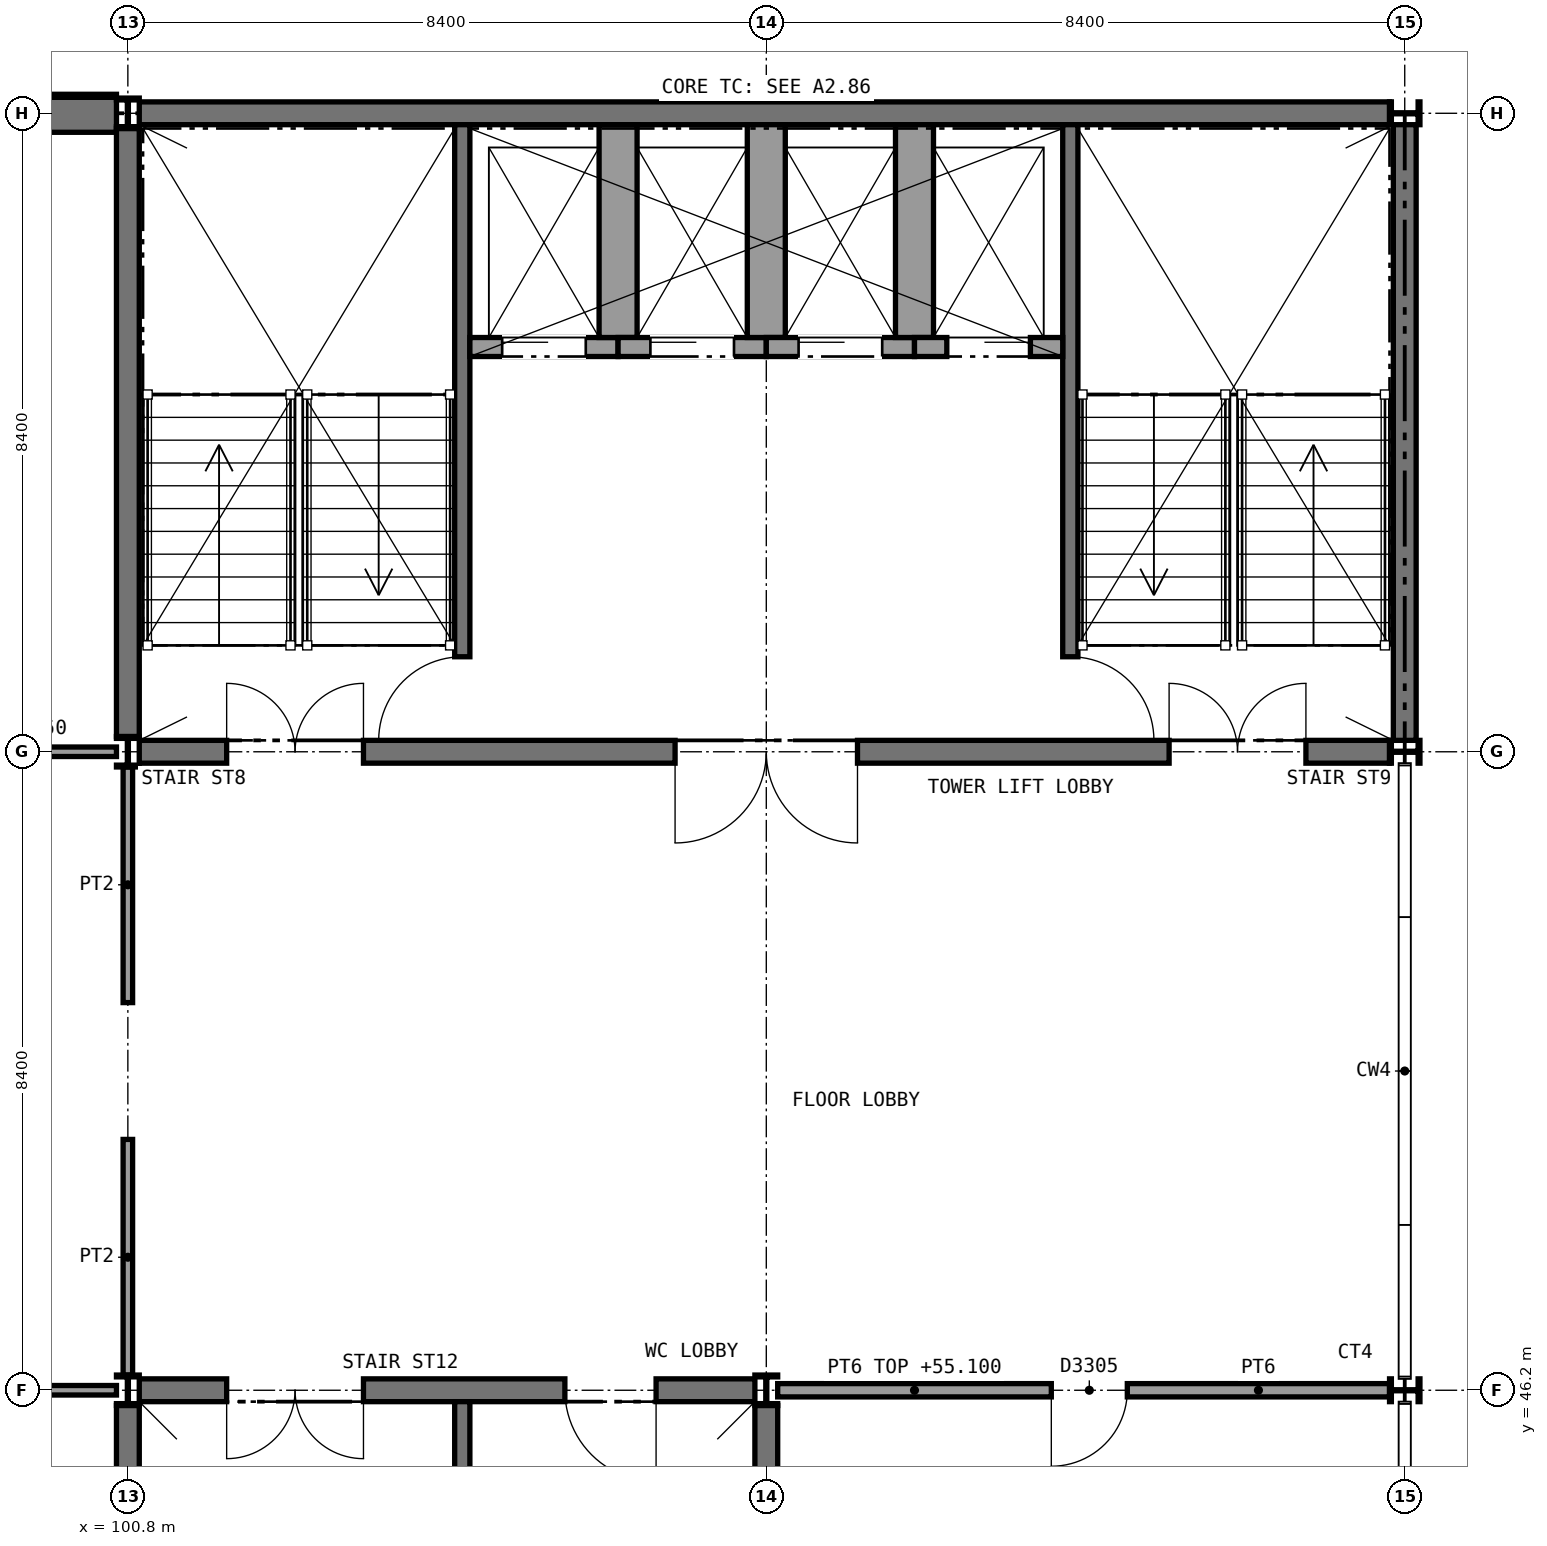
"""IFC4 building model, lengths in metres.
Left out: names, types, materials, properties, quantities, classifications, styles, units other than length and angle.
Written with IfcOpenShell. Run it as: python <this file> out.ifc"""

import sys

from ifc_helpers import new_model, si_unit, direction, frame, frame_2d, origin, origin_2d, place, context, subcontext, project, spatial, rectangle, i_section, extrude, element, fill, save


model = new_model("IFC4")
c1 = context("Model", 3, precision=1e-05, world=origin(), true_north=direction((0.0, 1.0)))
c2 = subcontext(c1, "Body", "Model", "MODEL_VIEW")
j1 = project(units=[si_unit("LENGTHUNIT", "METRE"), si_unit("PLANEANGLEUNIT", "RADIAN")], contexts=[c1])
p1 = place(None, origin())
s1 = spatial("IfcSite", under=j1, at=p1, CompositionType="ELEMENT")
p2 = place(p1, origin())
s2 = spatial("IfcBuilding", under=s1, at=p2, CompositionType="ELEMENT")
p3 = place(p2, frame((0.0, 0.0, 51.6)))
s3 = spatial("IfcBuildingStorey", under=s2, at=p3, CompositionType="ELEMENT", Elevation=51.6)
p4 = place(p3, frame((92.475, 63.0, 0.0), z_axis=(0.0, 0.0, 1.0), x_axis=(1.0, 0.0, 0.0)))
e1 = element("IfcWall", 1, at=p4, inside=s3, PredefinedType="SHEAR", context=c2, shape_type="SweptSolid", body=[
    extrude(rectangle(XDim=8.175, YDim=0.5, at=frame_2d((4.088, 0.0))), origin(), (0.0, 0.0, 1.0), 3.85),
])
p5 = place(p3, frame((100.95, 63.0, 0.0), z_axis=(0.0, 0.0, 1.0), x_axis=(1.0, 0.0, 0.0)))
e2 = element("IfcWall", 2, at=p5, inside=s3, PredefinedType="SHEAR", context=c2, shape_type="SweptSolid", body=[
    extrude(rectangle(XDim=16.45, YDim=0.3, at=frame_2d((8.225, 0.0))), origin(), (0.0, 0.0, 1.0), 3.85),
])
p6 = place(p3, frame((100.95, 54.6, 0.0), z_axis=(0.0, 0.0, 1.0), x_axis=(1.0, 0.0, 0.0)))
e3 = element("IfcWall", 3, at=p6, inside=s3, PredefinedType="SHEAR", context=c2, shape_type="SweptSolid", body=[
    extrude(rectangle(XDim=16.45, YDim=0.3, at=frame_2d((8.225, 0.0))), origin(), (0.0, 0.0, 1.0), 3.85),
])
p7 = place(p6, frame((1.15, 0.0, 0.0)))
e4 = element("IfcOpeningElement", 4, at=p7, cuts=e3, PredefinedType="OPENING", context=c2, shape_type="SweptSolid", body=[
    extrude(rectangle(XDim=1.8, YDim=2.1, at=frame_2d((0.9, 1.05))), frame((0.0, 0.16, 0.0), z_axis=(0.0, -1.0, 0.0), x_axis=(1.0, 0.0, 0.0)), (0.0, 0.0, 1.0), 0.32),
])
p8 = place(p6, frame((13.55, 0.0, 0.0)))
e5 = element("IfcOpeningElement", 5, at=p8, cuts=e3, PredefinedType="OPENING", context=c2, shape_type="SweptSolid", body=[
    extrude(rectangle(XDim=1.8, YDim=2.1, at=frame_2d((0.9, 1.05))), frame((0.0, 0.16, 0.0), z_axis=(0.0, -1.0, 0.0), x_axis=(1.0, 0.0, 0.0)), (0.0, 0.0, 1.0), 0.32),
])
p9 = place(p6, frame((7.05, 0.0, 0.0)))
e6 = element("IfcOpeningElement", 6, at=p9, cuts=e3, PredefinedType="OPENING", context=c2, shape_type="SweptSolid", body=[
    extrude(rectangle(XDim=2.4, YDim=2.4, at=frame_2d((1.2, 1.2))), frame((0.0, 0.16, 0.0), z_axis=(0.0, -1.0, 0.0), x_axis=(1.0, 0.0, 0.0)), (0.0, 0.0, 1.0), 0.32),
])
p10 = place(p3, frame((100.8, 54.8, 0.0), z_axis=(0.0, 0.0, 1.0), x_axis=(0.0, 1.0, 0.0)))
e7 = element("IfcWall", 7, at=p10, inside=s3, PredefinedType="SHEAR", context=c2, shape_type="SweptSolid", body=[
    extrude(rectangle(XDim=8.0, YDim=0.3, at=frame_2d((4.0, 0.0))), origin(), (0.0, 0.0, 1.0), 3.85),
])
p11 = place(p3, frame((117.6, 54.75, 0.0), z_axis=(0.0, 0.0, 1.0), x_axis=(0.0, 1.0, 0.0)))
e8 = element("IfcWall", 8, at=p11, inside=s3, PredefinedType="SHEAR", context=c2, shape_type="SweptSolid", body=[
    extrude(rectangle(XDim=8.1, YDim=0.3, at=frame_2d((4.05, 0.0))), origin(), (0.0, 0.0, 1.0), 3.85),
])
p12 = place(p3, frame((100.95, 46.2, 0.0), z_axis=(0.0, 0.0, 1.0), x_axis=(1.0, 0.0, 0.0)))
e9 = element("IfcWall", 9, at=p12, inside=s3, PredefinedType="SHEAR", context=c2, shape_type="SweptSolid", body=[
    extrude(rectangle(XDim=8.1, YDim=0.3, at=frame_2d((4.05, 0.0))), origin(), (0.0, 0.0, 1.0), 3.85),
])
p13 = place(p12, frame((1.15, 0.0, 0.0)))
e10 = element("IfcOpeningElement", 10, at=p13, cuts=e9, PredefinedType="OPENING", context=c2, shape_type="SweptSolid", body=[
    extrude(rectangle(XDim=1.8, YDim=2.1, at=frame_2d((0.9, 1.05))), frame((0.0, 0.16, 0.0), z_axis=(0.0, -1.0, 0.0), x_axis=(1.0, 0.0, 0.0)), (0.0, 0.0, 1.0), 0.32),
])
p14 = place(p12, frame((5.6, 0.0, 0.0)))
e11 = element("IfcOpeningElement", 11, at=p14, cuts=e9, PredefinedType="OPENING", context=c2, shape_type="SweptSolid", body=[
    extrude(rectangle(XDim=1.2, YDim=2.1, at=frame_2d((0.6, 1.05))), frame((0.0, 0.16, 0.0), z_axis=(0.0, -1.0, 0.0), x_axis=(1.0, 0.0, 0.0)), (0.0, 0.0, 1.0), 0.32),
])
for number, where, z_axis, x_axis in (
    (12, (100.8, 38.0, 0.0), (0.0, 0.0, 1.0), (0.0, 1.0, 0.0)),
    (13, (109.2, 38.0, 0.0), (0.0, 0.0, 1.0), (0.0, 1.0, 0.0)),
):
    element("IfcWall", number, at=place(p3, frame(where, z_axis=z_axis, x_axis=x_axis)), inside=s3, PredefinedType="SHEAR", context=c2, shape_type="SweptSolid", body=[
        extrude(rectangle(XDim=8.0, YDim=0.3, at=frame_2d((4.0, 0.0))), origin(), (0.0, 0.0, 1.0), 3.85),
    ])
for number, where, z_axis, x_axis in (
    (14, (100.8, 46.2, 0.0), (0.0, 0.0, 1.0), (1.0, 0.0, 0.0)),
    (15, (100.8, 54.6, 0.0), (0.0, 0.0, 1.0), (1.0, 0.0, 0.0)),
    (16, (100.8, 63.0, 0.0), (0.0, 0.0, 1.0), (1.0, 0.0, 0.0)),
    (17, (109.2, 46.2, 0.0), (0.0, 0.0, 1.0), (1.0, 0.0, 0.0)),
    (18, (117.6, 46.2, 0.0), (0.0, 0.0, 1.0), (0.0, 1.0, 0.0)),
    (19, (117.6, 54.6, 0.0), (0.0, 0.0, 1.0), (0.0, 1.0, 0.0)),
    (20, (117.6, 63.0, 0.0), (0.0, 0.0, 1.0), (0.0, 1.0, 0.0)),
):
    element("IfcColumn", number, at=place(p3, frame(where, z_axis=z_axis, x_axis=x_axis)), inside=s3, PredefinedType="COLUMN", context=c2, shape_type="SweptSolid", body=[
        extrude(i_section(OverallWidth=0.3, OverallDepth=0.4, WebThickness=0.013, FlangeThickness=0.024, FilletRadius=0.027, at=origin_2d()), origin(), (0.0, 0.0, 1.0), 4.0),
    ])
p15 = place(p3, frame((92.55, 46.2, 0.0), z_axis=(0.0, 0.0, 1.0), x_axis=(1.0, 0.0, 0.0)))
e21 = element("IfcWall", 21, at=p15, inside=s3, PredefinedType="PARTITIONING", context=c2, shape_type="SweptSolid", body=[
    extrude(rectangle(XDim=8.1, YDim=0.125, at=frame_2d((4.05, 0.0))), origin(), (0.0, 0.0, 1.0), 3.5),
])
p16 = place(p15, frame((3.1, 0.0, 0.0)))
e22 = element("IfcOpeningElement", 22, at=p16, cuts=e21, PredefinedType="OPENING", context=c2, shape_type="SweptSolid", body=[
    extrude(rectangle(XDim=1.8, YDim=2.1, at=frame_2d((0.9, 1.05))), frame((0.0, 0.073, 0.0), z_axis=(0.0, -1.0, 0.0), x_axis=(1.0, 0.0, 0.0)), (0.0, 0.0, 1.0), 0.145),
])
p17 = place(p3, frame((109.35, 46.2, 0.0), z_axis=(0.0, 0.0, 1.0), x_axis=(1.0, 0.0, 0.0)))
e23 = element("IfcWall", 23, at=p17, inside=s3, PredefinedType="PARTITIONING", context=c2, shape_type="SweptSolid", body=[
    extrude(rectangle(XDim=8.05, YDim=0.175, at=frame_2d((4.025, 0.0))), origin(), (0.0, 0.0, 1.0), 3.5),
])
p18 = place(p17, frame((3.6, 0.0, 0.0)))
e24 = element("IfcOpeningElement", 24, at=p18, cuts=e23, PredefinedType="OPENING", context=c2, shape_type="SweptSolid", body=[
    extrude(rectangle(XDim=1.0, YDim=2.1, at=frame_2d((0.5, 1.05))), frame((0.0, 0.098, 0.0), z_axis=(0.0, -1.0, 0.0), x_axis=(1.0, 0.0, 0.0)), (0.0, 0.0, 1.0), 0.195),
])
for number, where, z_axis, x_axis in (
    (25, (100.8, 46.4, 0.0), (0.0, 0.0, 1.0), (0.0, 1.0, 0.0)),
    (26, (100.8, 51.3, 0.0), (0.0, 0.0, 1.0), (0.0, 1.0, 0.0)),
):
    element("IfcWall", number, at=place(p3, frame(where, z_axis=z_axis, x_axis=x_axis)), inside=s3, PredefinedType="PARTITIONING", context=c2, shape_type="SweptSolid", body=[
        extrude(rectangle(XDim=3.1, YDim=0.125, at=frame_2d((1.55, 0.0))), origin(), (0.0, 0.0, 1.0), 3.5),
    ])
p19 = place(p3, frame((92.55, 54.6, 0.0), z_axis=(0.0, 0.0, 1.0), x_axis=(1.0, 0.0, 0.0)))
e27 = element("IfcWall", 27, at=p19, inside=s3, PredefinedType="PARTITIONING", context=c2, shape_type="SweptSolid", body=[
    extrude(rectangle(XDim=8.1, YDim=0.125, at=frame_2d((4.05, 0.0))), origin(), (0.0, 0.0, 1.0), 3.56),
])
p20 = place(p19, frame((3.6, 0.0, 0.0)))
e28 = element("IfcOpeningElement", 28, at=p20, cuts=e27, PredefinedType="OPENING", context=c2, shape_type="SweptSolid", body=[
    extrude(rectangle(XDim=0.9, YDim=2.1, at=frame_2d((0.45, 1.05))), frame((0.0, 0.073, 0.0), z_axis=(0.0, -1.0, 0.0), x_axis=(1.0, 0.0, 0.0)), (0.0, 0.0, 1.0), 0.145),
])
p21 = place(p3, frame((105.2, 62.85, 0.0), z_axis=(0.0, 0.0, 1.0), x_axis=(0.0, -1.0, 0.0)))
e29 = element("IfcWall", 29, at=p21, inside=s3, PredefinedType="SHEAR", context=c2, shape_type="SweptSolid", body=[
    extrude(rectangle(XDim=8.1, YDim=0.2, at=frame_2d((4.05, 0.0))), origin(), (0.0, 0.0, 1.0), 3.85),
])
p22 = place(p21, frame((7.0, 0.0, 0.0)))
e30 = element("IfcOpeningElement", 30, at=p22, cuts=e29, PredefinedType="OPENING", context=c2, shape_type="SweptSolid", body=[
    extrude(rectangle(XDim=1.11, YDim=2.1, at=frame_2d((0.555, 1.05))), frame((0.0, 0.11, 0.0), z_axis=(0.0, -1.0, 0.0), x_axis=(1.0, 0.0, 0.0)), (0.0, 0.0, 1.0), 0.22),
])
p23 = place(p3, frame((113.2, 62.85, 0.0), z_axis=(0.0, 0.0, 1.0), x_axis=(0.0, -1.0, 0.0)))
e31 = element("IfcWall", 31, at=p23, inside=s3, PredefinedType="SHEAR", context=c2, shape_type="SweptSolid", body=[
    extrude(rectangle(XDim=8.1, YDim=0.2, at=frame_2d((4.05, 0.0))), origin(), (0.0, 0.0, 1.0), 3.85),
])
p24 = place(p23, frame((7.0, 0.0, 0.0)))
e32 = element("IfcOpeningElement", 32, at=p24, cuts=e31, PredefinedType="OPENING", context=c2, shape_type="SweptSolid", body=[
    extrude(rectangle(XDim=1.11, YDim=2.1, at=frame_2d((0.555, 1.05))), frame((0.0, 0.11, 0.0), z_axis=(0.0, -1.0, 0.0), x_axis=(1.0, 0.0, 0.0)), (0.0, 0.0, 1.0), 0.22),
])
p25 = place(p3, frame((105.3, 59.925, 0.0), z_axis=(0.0, 0.0, 1.0), x_axis=(1.0, 0.0, 0.0)))
e33 = element("IfcWall", 33, at=p25, inside=s3, PredefinedType="SOLIDWALL", context=c2, shape_type="SweptSolid", body=[
    extrude(rectangle(XDim=1.95, YDim=0.25, at=frame_2d((0.975, 0.0))), origin(), (0.0, 0.0, 1.0), 4.0),
])
p26 = place(p25, frame((0.425, 0.0, 0.0)))
e34 = element("IfcOpeningElement", 34, at=p26, cuts=e33, PredefinedType="OPENING", context=c2, shape_type="SweptSolid", body=[
    extrude(rectangle(XDim=1.1, YDim=2.1, at=frame_2d((0.55, 1.05))), frame((0.0, 0.135, 0.0), z_axis=(0.0, -1.0, 0.0), x_axis=(1.0, 0.0, 0.0)), (0.0, 0.0, 1.0), 0.27),
])
p27 = place(p3, frame((107.25, 62.85, 0.0), z_axis=(0.0, 0.0, 1.0), x_axis=(0.0, -1.0, 0.0)))
e35 = element("IfcWall", 35, at=p27, inside=s3, PredefinedType="SOLIDWALL", context=c2, shape_type="SweptSolid", body=[
    extrude(rectangle(XDim=2.8, YDim=0.5, at=frame_2d((1.4, 0.0))), origin(), (0.0, 0.0, 1.0), 4.0),
])
p28 = place(p3, frame((107.25, 59.925, 0.0), z_axis=(0.0, 0.0, 1.0), x_axis=(1.0, 0.0, 0.0)))
e36 = element("IfcWall", 36, at=p28, inside=s3, PredefinedType="SOLIDWALL", context=c2, shape_type="SweptSolid", body=[
    extrude(rectangle(XDim=1.95, YDim=0.25, at=frame_2d((0.975, 0.0))), origin(), (0.0, 0.0, 1.0), 4.0),
])
p29 = place(p28, frame((0.425, 0.0, 0.0)))
e37 = element("IfcOpeningElement", 37, at=p29, cuts=e36, PredefinedType="OPENING", context=c2, shape_type="SweptSolid", body=[
    extrude(rectangle(XDim=1.1, YDim=2.1, at=frame_2d((0.55, 1.05))), frame((0.0, 0.135, 0.0), z_axis=(0.0, -1.0, 0.0), x_axis=(1.0, 0.0, 0.0)), (0.0, 0.0, 1.0), 0.27),
])
p30 = place(p3, frame((109.2, 62.85, 0.0), z_axis=(0.0, 0.0, 1.0), x_axis=(0.0, -1.0, 0.0)))
e38 = element("IfcWall", 38, at=p30, inside=s3, PredefinedType="SOLIDWALL", context=c2, shape_type="SweptSolid", body=[
    extrude(rectangle(XDim=2.8, YDim=0.5, at=frame_2d((1.4, 0.0))), origin(), (0.0, 0.0, 1.0), 4.0),
])
p31 = place(p3, frame((109.2, 59.925, 0.0), z_axis=(0.0, 0.0, 1.0), x_axis=(1.0, 0.0, 0.0)))
e39 = element("IfcWall", 39, at=p31, inside=s3, PredefinedType="SOLIDWALL", context=c2, shape_type="SweptSolid", body=[
    extrude(rectangle(XDim=1.95, YDim=0.25, at=frame_2d((0.975, 0.0))), origin(), (0.0, 0.0, 1.0), 4.0),
])
p32 = place(p31, frame((0.425, 0.0, 0.0)))
e40 = element("IfcOpeningElement", 40, at=p32, cuts=e39, PredefinedType="OPENING", context=c2, shape_type="SweptSolid", body=[
    extrude(rectangle(XDim=1.1, YDim=2.1, at=frame_2d((0.55, 1.05))), frame((0.0, 0.135, 0.0), z_axis=(0.0, -1.0, 0.0), x_axis=(1.0, 0.0, 0.0)), (0.0, 0.0, 1.0), 0.27),
])
p33 = place(p3, frame((111.15, 62.85, 0.0), z_axis=(0.0, 0.0, 1.0), x_axis=(0.0, -1.0, 0.0)))
e41 = element("IfcWall", 41, at=p33, inside=s3, PredefinedType="SOLIDWALL", context=c2, shape_type="SweptSolid", body=[
    extrude(rectangle(XDim=2.8, YDim=0.5, at=frame_2d((1.4, 0.0))), origin(), (0.0, 0.0, 1.0), 4.0),
])
p34 = place(p3, frame((111.15, 59.925, 0.0), z_axis=(0.0, 0.0, 1.0), x_axis=(1.0, 0.0, 0.0)))
e42 = element("IfcWall", 42, at=p34, inside=s3, PredefinedType="SOLIDWALL", context=c2, shape_type="SweptSolid", body=[
    extrude(rectangle(XDim=1.95, YDim=0.25, at=frame_2d((0.975, 0.0))), origin(), (0.0, 0.0, 1.0), 4.0),
])
p35 = place(p34, frame((0.425, 0.0, 0.0)))
e43 = element("IfcOpeningElement", 43, at=p35, cuts=e42, PredefinedType="OPENING", context=c2, shape_type="SweptSolid", body=[
    extrude(rectangle(XDim=1.1, YDim=2.1, at=frame_2d((0.55, 1.05))), frame((0.0, 0.135, 0.0), z_axis=(0.0, -1.0, 0.0), x_axis=(1.0, 0.0, 0.0)), (0.0, 0.0, 1.0), 0.27),
])
p36 = place(p3, frame((105.2, 37.95, 0.0), z_axis=(0.0, 0.0, 1.0), x_axis=(0.0, 1.0, 0.0)))
e44 = element("IfcWall", 44, at=p36, inside=s3, PredefinedType="SHEAR", context=c2, shape_type="SweptSolid", body=[
    extrude(rectangle(XDim=8.1, YDim=0.2, at=frame_2d((4.05, 0.0))), origin(), (0.0, 0.0, 1.0), 3.85),
])
p37 = place(p18, frame((1.0, 0.0, 0.0), z_axis=(0.0, 0.0, 1.0), x_axis=(-1.0, 0.0, 0.0)))
e45 = element("IfcDoor", 45, at=p37, inside=s3, OperationType="SINGLE_SWING_RIGHT", PredefinedType="DOOR", context=c2, shape_type="SweptSolid", body=[
    extrude(rectangle(XDim=1.0, YDim=2.1, at=frame_2d((0.5, 1.05))), frame((0.0, 0.025, 0.0), z_axis=(0.0, -1.0, 0.0), x_axis=(1.0, 0.0, 0.0)), (0.0, 0.0, 1.0), 0.05),
])
fill(e24, e45)
p38 = place(p22, frame((1.1, 0.0, 0.0), z_axis=(0.0, 0.0, 1.0), x_axis=(-1.0, 0.0, 0.0)))
e46 = element("IfcDoor", 46, at=p38, inside=s3, OperationType="SINGLE_SWING_LEFT", PredefinedType="DOOR", context=c2, shape_type="SweptSolid", body=[
    extrude(rectangle(XDim=1.1, YDim=2.1, at=frame_2d((0.55, 1.05))), frame((0.0, 0.025, 0.0), z_axis=(0.0, -1.0, 0.0), x_axis=(1.0, 0.0, 0.0)), (0.0, 0.0, 1.0), 0.05),
])
fill(e30, e46)
p39 = place(p24, origin())
e47 = element("IfcDoor", 47, at=p39, inside=s3, OperationType="SINGLE_SWING_RIGHT", PredefinedType="DOOR", context=c2, shape_type="SweptSolid", body=[
    extrude(rectangle(XDim=1.1, YDim=2.1, at=frame_2d((0.55, 1.05))), frame((0.0, 0.025, 0.0), z_axis=(0.0, -1.0, 0.0), x_axis=(1.0, 0.0, 0.0)), (0.0, 0.0, 1.0), 0.05),
])
fill(e32, e47)
p40 = place(p26, frame((1.1, 0.0, 0.0), z_axis=(0.0, 0.0, 1.0), x_axis=(-1.0, 0.0, 0.0)))
e48 = element("IfcDoor", 48, at=p40, inside=s3, OperationType="SLIDING_TO_RIGHT", PredefinedType="DOOR", context=c2, shape_type="SweptSolid", body=[
    extrude(rectangle(XDim=1.1, YDim=2.1, at=frame_2d((0.55, 1.05))), frame((0.0, 0.025, 0.0), z_axis=(0.0, -1.0, 0.0), x_axis=(1.0, 0.0, 0.0)), (0.0, 0.0, 1.0), 0.05),
])
fill(e34, e48)
p41 = place(p29, frame((1.1, 0.0, 0.0), z_axis=(0.0, 0.0, 1.0), x_axis=(-1.0, 0.0, 0.0)))
e49 = element("IfcDoor", 49, at=p41, inside=s3, OperationType="SLIDING_TO_RIGHT", PredefinedType="DOOR", context=c2, shape_type="SweptSolid", body=[
    extrude(rectangle(XDim=1.1, YDim=2.1, at=frame_2d((0.55, 1.05))), frame((0.0, 0.025, 0.0), z_axis=(0.0, -1.0, 0.0), x_axis=(1.0, 0.0, 0.0)), (0.0, 0.0, 1.0), 0.05),
])
fill(e37, e49)
p42 = place(p32, frame((1.1, 0.0, 0.0), z_axis=(0.0, 0.0, 1.0), x_axis=(-1.0, 0.0, 0.0)))
e50 = element("IfcDoor", 50, at=p42, inside=s3, OperationType="SLIDING_TO_RIGHT", PredefinedType="DOOR", context=c2, shape_type="SweptSolid", body=[
    extrude(rectangle(XDim=1.1, YDim=2.1, at=frame_2d((0.55, 1.05))), frame((0.0, 0.025, 0.0), z_axis=(0.0, -1.0, 0.0), x_axis=(1.0, 0.0, 0.0)), (0.0, 0.0, 1.0), 0.05),
])
fill(e40, e50)
p43 = place(p35, frame((1.1, 0.0, 0.0), z_axis=(0.0, 0.0, 1.0), x_axis=(-1.0, 0.0, 0.0)))
e51 = element("IfcDoor", 51, at=p43, inside=s3, OperationType="SLIDING_TO_LEFT", PredefinedType="DOOR", context=c2, shape_type="SweptSolid", body=[
    extrude(rectangle(XDim=1.1, YDim=2.1, at=frame_2d((0.55, 1.05))), frame((0.0, 0.025, 0.0), z_axis=(0.0, -1.0, 0.0), x_axis=(1.0, 0.0, 0.0)), (0.0, 0.0, 1.0), 0.05),
])
fill(e43, e51)
p44 = place(p7, origin())
e52 = element("IfcDoor", 52, at=p44, inside=s3, OperationType="DOUBLE_DOOR_SINGLE_SWING", PredefinedType="DOOR", context=c2, shape_type="SweptSolid", body=[
    extrude(rectangle(XDim=1.8, YDim=2.1, at=frame_2d((0.9, 1.05))), frame((0.0, 0.025, 0.0), z_axis=(0.0, -1.0, 0.0), x_axis=(1.0, 0.0, 0.0)), (0.0, 0.0, 1.0), 0.05),
])
fill(e4, e52)
p45 = place(p8, origin())
e53 = element("IfcDoor", 53, at=p45, inside=s3, OperationType="DOUBLE_DOOR_SINGLE_SWING", PredefinedType="DOOR", context=c2, shape_type="SweptSolid", body=[
    extrude(rectangle(XDim=1.8, YDim=2.1, at=frame_2d((0.9, 1.05))), frame((0.0, 0.025, 0.0), z_axis=(0.0, -1.0, 0.0), x_axis=(1.0, 0.0, 0.0)), (0.0, 0.0, 1.0), 0.05),
])
fill(e5, e53)
p46 = place(p9, frame((2.4, 0.0, 0.0), z_axis=(0.0, 0.0, 1.0), x_axis=(-1.0, 0.0, 0.0)))
e54 = element("IfcDoor", 54, at=p46, inside=s3, OperationType="DOUBLE_DOOR_SINGLE_SWING", PredefinedType="DOOR", context=c2, shape_type="SweptSolid", body=[
    extrude(rectangle(XDim=2.4, YDim=2.4, at=frame_2d((1.2, 1.2))), frame((0.0, 0.025, 0.0), z_axis=(0.0, -1.0, 0.0), x_axis=(1.0, 0.0, 0.0)), (0.0, 0.0, 1.0), 0.05),
])
fill(e6, e54)
p47 = place(p13, frame((1.8, 0.0, 0.0), z_axis=(0.0, 0.0, 1.0), x_axis=(-1.0, 0.0, 0.0)))
e55 = element("IfcDoor", 55, at=p47, inside=s3, OperationType="DOUBLE_DOOR_SINGLE_SWING", PredefinedType="DOOR", context=c2, shape_type="SweptSolid", body=[
    extrude(rectangle(XDim=1.8, YDim=2.1, at=frame_2d((0.9, 1.05))), frame((0.0, 0.025, 0.0), z_axis=(0.0, -1.0, 0.0), x_axis=(1.0, 0.0, 0.0)), (0.0, 0.0, 1.0), 0.05),
])
fill(e10, e55)
p48 = place(p14, frame((1.2, 0.0, 0.0), z_axis=(0.0, 0.0, 1.0), x_axis=(-1.0, 0.0, 0.0)))
e56 = element("IfcDoor", 56, at=p48, inside=s3, OperationType="SINGLE_SWING_LEFT", PredefinedType="DOOR", context=c2, shape_type="SweptSolid", body=[
    extrude(rectangle(XDim=1.2, YDim=2.1, at=frame_2d((0.6, 1.05))), frame((0.0, 0.025, 0.0), z_axis=(0.0, -1.0, 0.0), x_axis=(1.0, 0.0, 0.0)), (0.0, 0.0, 1.0), 0.05),
])
fill(e11, e56)
save(model, sys.argv[1])
